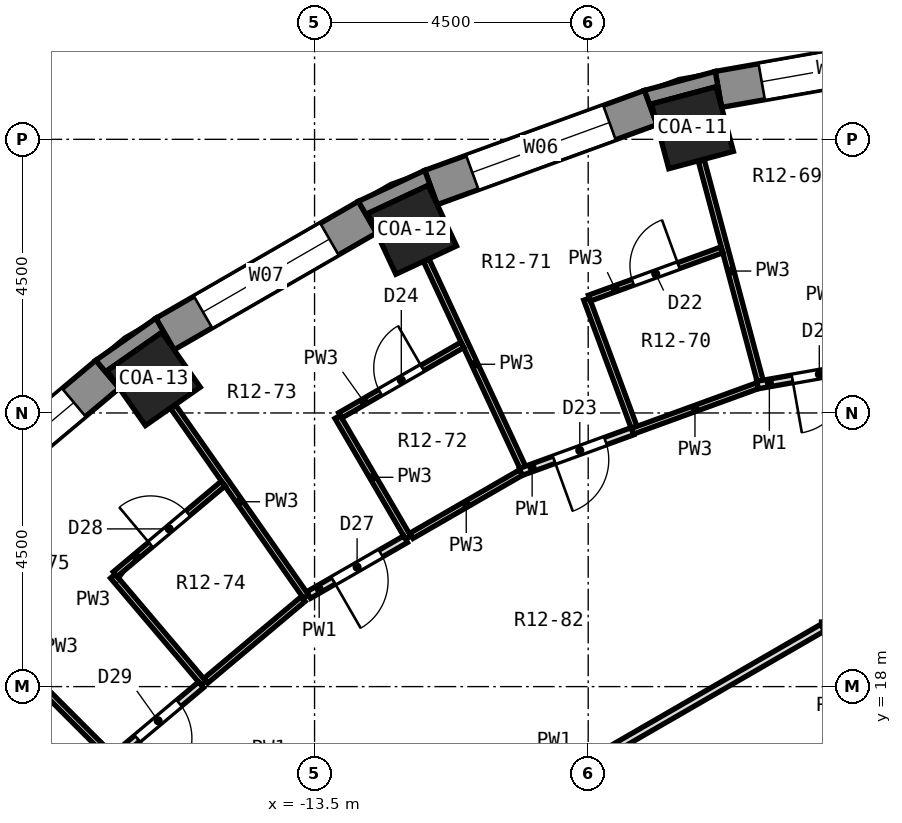
"""IFC4 building model, lengths in metres.
Left out: names, types, materials, properties, quantities, classifications, styles, units other than length and angle.
Written with IfcOpenShell. Run it as: python <this file> out.ifc"""

import sys

from ifc_helpers import new_model, si_unit, direction, frame, frame_2d, origin, origin_2d, place, context, subcontext, project, spatial, polyline, rectangle, outline, extrude, element, fill, save


model = new_model("IFC4")
c1 = context("Model", 3, precision=1e-05, world=origin(), true_north=direction((0.0, 1.0)))
c2 = subcontext(c1, "Body", "Model", "MODEL_VIEW")
j1 = project(units=[si_unit("LENGTHUNIT", "METRE"), si_unit("PLANEANGLEUNIT", "RADIAN")], contexts=[c1])
p1 = place(None, origin())
s1 = spatial("IfcSite", under=j1, at=p1, CompositionType="ELEMENT")
p2 = place(p1, origin())
s2 = spatial("IfcBuilding", under=s1, at=p2, CompositionType="ELEMENT")
p3 = place(p2, frame((0.0, 0.0, 56.0)))
s3 = spatial("IfcBuildingStorey", under=s2, at=p3, CompositionType="ELEMENT", Elevation=56.0)
for number, where, z_axis, x_axis in (
    (1, (-7.286, 27.191, 0.0), (0.0, 0.0, 1.0), (-0.259, 0.966, 0.0)),
    (2, (-11.897, 25.512, 0.0), (0.0, 0.0, 1.0), (-0.423, 0.906, 0.0)),
    (3, (-16.146, 23.059, 0.0), (0.0, 0.0, 1.0), (-0.574, 0.819, 0.0)),
):
    element("IfcColumn", number, at=place(p3, frame(where, z_axis=z_axis, x_axis=x_axis)), inside=s3, PredefinedType="COLUMN", context=c2, shape_type="SweptSolid", body=[
        extrude(rectangle(XDim=1.1, YDim=1.1, at=origin_2d()), origin(), (0.0, 0.0, 1.0), 3.3),
    ])
p4 = place(p3, frame((-3.071, 28.489, 0.0), z_axis=(0.0, 0.0, 1.0), x_axis=(-0.984800809218, -0.173687553279, 0.0)))
e4 = element("IfcWall", 4, at=p4, inside=s3, PredefinedType="SOLIDWALL", context=c2, shape_type="SweptSolid", body=[
    extrude(rectangle(XDim=3.846, YDim=0.6, at=frame_2d((1.923, 0.0))), origin(), (0.0, 0.0, 1.0), 2.75),
])
p5 = place(p4, frame((0.723, 0.0, 0.9)))
e5 = element("IfcOpeningElement", 5, at=p5, cuts=e4, PredefinedType="OPENING", context=c2, shape_type="SweptSolid", body=[
    extrude(rectangle(XDim=2.4, YDim=1.8, at=frame_2d((1.2, 0.9))), frame((0.0, 0.312, 0.0), z_axis=(0.0, -1.0, 0.0), x_axis=(1.0, 0.0, 0.0)), (0.0, 0.0, 1.0), 0.624),
])
p6 = place(p3, frame((-7.971, 27.523, 0.0), z_axis=(0.0, 0.0, 1.0), x_axis=(-0.939689588564, -0.342028474173, 0.0)))
e6 = element("IfcWall", 6, at=p6, inside=s3, PredefinedType="SOLIDWALL", context=c2, shape_type="SweptSolid", body=[
    extrude(rectangle(XDim=3.846, YDim=0.6, at=frame_2d((1.923, 0.0))), origin(), (0.0, 0.0, 1.0), 2.75),
])
p7 = place(p6, frame((0.723, 0.0, 0.9)))
e7 = element("IfcOpeningElement", 7, at=p7, cuts=e6, PredefinedType="OPENING", context=c2, shape_type="SweptSolid", body=[
    extrude(rectangle(XDim=2.4, YDim=1.8, at=frame_2d((1.2, 0.9))), frame((0.0, 0.312, 0.0), z_axis=(0.0, -1.0, 0.0), x_axis=(1.0, 0.0, 0.0)), (0.0, 0.0, 1.0), 0.624),
])
p8 = place(p3, frame((-12.63, 25.721, 0.0), z_axis=(0.0, 0.0, 1.0), x_axis=(-0.86603124159, -0.499989888488, 0.0)))
e8 = element("IfcWall", 8, at=p8, inside=s3, PredefinedType="SOLIDWALL", context=c2, shape_type="SweptSolid", body=[
    extrude(rectangle(XDim=3.846, YDim=0.6, at=frame_2d((1.923, 0.0))), origin(), (0.0, 0.0, 1.0), 2.75),
])
p9 = place(p8, frame((0.723, 0.0, 0.9)))
e9 = element("IfcOpeningElement", 9, at=p9, cuts=e8, PredefinedType="OPENING", context=c2, shape_type="SweptSolid", body=[
    extrude(rectangle(XDim=2.4, YDim=1.8, at=frame_2d((1.2, 0.9))), frame((0.0, 0.312, 0.0), z_axis=(0.0, -1.0, 0.0), x_axis=(1.0, 0.0, 0.0)), (0.0, 0.0, 1.0), 0.624),
])
p10 = place(p3, frame((-16.904, 23.137, 0.0), z_axis=(0.0, 0.0, 1.0), x_axis=(-0.766026164483, -0.642809392687, 0.0)))
e10 = element("IfcWall", 10, at=p10, inside=s3, PredefinedType="SOLIDWALL", context=c2, shape_type="SweptSolid", body=[
    extrude(rectangle(XDim=3.846, YDim=0.6, at=frame_2d((1.923, 0.0))), origin(), (0.0, 0.0, 1.0), 2.75),
])
p11 = place(p10, frame((0.723, 0.0, 0.9)))
e11 = element("IfcOpeningElement", 11, at=p11, cuts=e10, PredefinedType="OPENING", context=c2, shape_type="SweptSolid", body=[
    extrude(rectangle(XDim=2.4, YDim=1.8, at=frame_2d((1.2, 0.9))), frame((0.0, 0.312, 0.0), z_axis=(0.0, -1.0, 0.0), x_axis=(1.0, 0.0, 0.0)), (0.0, 0.0, 1.0), 0.624),
])
p12 = place(p3, origin())
e12 = element("IfcWall", 12, at=p12, inside=s3, PredefinedType="SOLIDWALL", context=c2, shape_type="SweptSolid", body=[
    extrude(outline(polyline([(-6.91, 28.117), (-8.074, 27.805), (-7.869, 27.241), (-7.959, 27.58), (-6.897, 27.865), (-6.806, 27.526), (-6.91, 28.117)])), origin(), (0.0, 0.0, 1.0), 2.75),
])
p13 = place(p3, origin())
e13 = element("IfcWall", 13, at=p13, inside=s3, PredefinedType="SOLIDWALL", context=c2, shape_type="SweptSolid", body=[
    extrude(outline(polyline([(-12.78, 25.981), (-12.479, 25.461), (-12.628, 25.779), (-11.631, 26.243), (-11.483, 25.926), (-11.688, 26.49), (-12.78, 25.981)])), origin(), (0.0, 0.0, 1.0), 2.75),
])
p14 = place(p3, origin())
e14 = element("IfcWall", 14, at=p14, inside=s3, PredefinedType="SOLIDWALL", context=c2, shape_type="SweptSolid", body=[
    extrude(outline(polyline([(-16.11, 24.058), (-17.097, 23.367), (-16.711, 22.907), (-16.912, 23.194), (-16.011, 23.825), (-15.81, 23.538), (-16.11, 24.058)])), origin(), (0.0, 0.0, 1.0), 2.75),
])
p15 = place(p3, frame((-7.139, 26.65, 0.0), z_axis=(0.0, 0.0, 1.0), x_axis=(0.258074907141, -0.966124910301, 0.0)))
e15 = element("IfcWall", 15, at=p15, inside=s3, PredefinedType="PARTITIONING", context=c2, shape_type="SweptSolid", body=[
    extrude(rectangle(XDim=3.76, YDim=0.1, at=frame_2d((1.88, 0.0))), origin(), (0.0, 0.0, 1.0), 2.75),
])
p16 = place(p3, frame((-9.026, 24.372, 0.0), z_axis=(0.0, 0.0, 1.0), x_axis=(0.347445153589, -0.937700306733, 0.0)))
e16 = element("IfcWall", 16, at=p16, inside=s3, PredefinedType="PARTITIONING", context=c2, shape_type="SweptSolid", body=[
    extrude(rectangle(XDim=2.249, YDim=0.1, at=frame_2d((1.125, 0.0))), origin(), (0.0, 0.0, 1.0), 2.75),
])
p17 = place(p3, frame((-11.66, 25.005, 0.0), z_axis=(0.0, 0.0, 1.0), x_axis=(0.422316636066, -0.906448376303, 0.0)))
e17 = element("IfcWall", 17, at=p17, inside=s3, PredefinedType="PARTITIONING", context=c2, shape_type="SweptSolid", body=[
    extrude(rectangle(XDim=3.76, YDim=0.1, at=frame_2d((1.88, 0.0))), origin(), (0.0, 0.0, 1.0), 2.75),
])
p18 = place(p3, frame((-13.121, 22.435, 0.0), z_axis=(0.0, 0.0, 1.0), x_axis=(0.504708754908, -0.863289680651, 0.0)))
e18 = element("IfcWall", 18, at=p18, inside=s3, PredefinedType="PARTITIONING", context=c2, shape_type="SweptSolid", body=[
    extrude(rectangle(XDim=2.301, YDim=0.1, at=frame_2d((1.15, 0.0))), origin(), (0.0, 0.0, 1.0), 2.75),
])
p19 = place(p3, frame((-15.825, 22.601, 0.0), z_axis=(0.0, 0.0, 1.0), x_axis=(0.573574167811, -0.819153632733, 0.0)))
e19 = element("IfcWall", 19, at=p19, inside=s3, PredefinedType="PARTITIONING", context=c2, shape_type="SweptSolid", body=[
    extrude(rectangle(XDim=3.81, YDim=0.1, at=frame_2d((1.905, 0.0))), origin(), (0.0, 0.0, 1.0), 2.75),
])
p20 = place(p3, frame((-16.817, 19.816, 0.0), z_axis=(0.0, 0.0, 1.0), x_axis=(0.646883930741, -0.762588473653, 0.0)))
e20 = element("IfcWall", 20, at=p20, inside=s3, PredefinedType="PARTITIONING", context=c2, shape_type="SweptSolid", body=[
    extrude(rectangle(XDim=2.3, YDim=0.1, at=frame_2d((1.15, 0.0))), origin(), (0.0, 0.0, 1.0), 2.75),
])
p21 = place(p3, frame((-19.509, 19.509, 0.0), z_axis=(0.0, 0.0, 1.0), x_axis=(0.707106781187, -0.707106781187, 0.0)))
e21 = element("IfcWall", 21, at=p21, inside=s3, PredefinedType="PARTITIONING", context=c2, shape_type="SweptSolid", body=[
    extrude(rectangle(XDim=3.81, YDim=0.1, at=frame_2d((1.905, 0.0))), origin(), (0.0, 0.0, 1.0), 2.75),
])
p22 = place(p3, frame((-5.163, 19.0, 0.0), z_axis=(0.0, 0.0, 1.0), x_axis=(1.0, 0.0, 0.0)))
e22 = element("IfcWall", 22, at=p22, inside=s3, PredefinedType="PARTITIONING", context=c2, shape_type="SweptSolid", body=[
    extrude(rectangle(XDim=10.192, YDim=0.125, at=frame_2d((5.096, 0.0))), origin(), (0.0, 0.0, 1.0), 2.75),
])
p23 = place(p22, frame((6.242, 0.0, 0.0)))
e23 = element("IfcOpeningElement", 23, at=p23, cuts=e22, PredefinedType="OPENING", context=c2, shape_type="SweptSolid", body=[
    extrude(rectangle(XDim=1.0, YDim=2.1, at=frame_2d((0.5, 1.05))), frame((0.0, 0.074, 0.0), z_axis=(0.0, -1.0, 0.0), x_axis=(1.0, 0.0, 0.0)), (0.0, 0.0, 1.0), 0.149),
])
p24 = place(p3, frame((-6.218, 22.959, 0.0), z_axis=(0.0, 0.0, 1.0), x_axis=(0.984803677322, 0.173671290469, 0.0)))
e24 = element("IfcWall", 24, at=p24, inside=s3, PredefinedType="PARTITIONING", context=c2, shape_type="SweptSolid", body=[
    extrude(rectangle(XDim=1.954, YDim=0.125, at=frame_2d((0.977, 0.0))), origin(), (0.0, 0.0, 1.0), 2.75),
])
p25 = place(p24, frame((0.584, 0.0, 0.0)))
e25 = element("IfcOpeningElement", 25, at=p25, cuts=e24, PredefinedType="OPENING", context=c2, shape_type="SweptSolid", body=[
    extrude(rectangle(XDim=0.9, YDim=2.1, at=frame_2d((0.45, 1.05))), frame((0.0, 0.074, 0.0), z_axis=(0.0, -1.0, 0.0), x_axis=(1.0, 0.0, 0.0)), (0.0, 0.0, 1.0), 0.149),
])
p26 = place(p3, frame((-8.274, 22.199, 0.0), z_axis=(0.0, 0.0, 1.0), x_axis=(0.939712116987, 0.341966573204, 0.0)))
e26 = element("IfcWall", 26, at=p26, inside=s3, PredefinedType="PARTITIONING", context=c2, shape_type="SweptSolid", body=[
    extrude(rectangle(XDim=2.192, YDim=0.1, at=frame_2d((1.096, 0.0))), origin(), (0.0, 0.0, 1.0), 2.75),
])
p27 = place(p3, frame((-10.11, 21.53, 0.0), z_axis=(0.0, 0.0, 1.0), x_axis=(0.939599898996, 0.342274786986, 0.0)))
e27 = element("IfcWall", 27, at=p27, inside=s3, PredefinedType="PARTITIONING", context=c2, shape_type="SweptSolid", body=[
    extrude(rectangle(XDim=1.954, YDim=0.125, at=frame_2d((0.977, 0.0))), origin(), (0.0, 0.0, 1.0), 2.75),
])
p28 = place(p27, frame((0.583, 0.0, 0.0)))
e28 = element("IfcOpeningElement", 28, at=p28, cuts=e27, PredefinedType="OPENING", context=c2, shape_type="SweptSolid", body=[
    extrude(rectangle(XDim=0.9, YDim=2.1, at=frame_2d((0.45, 1.05))), frame((0.0, 0.074, 0.0), z_axis=(0.0, -1.0, 0.0), x_axis=(1.0, 0.0, 0.0)), (0.0, 0.0, 1.0), 0.149),
])
p29 = place(p3, frame((-8.979, 24.389, 0.0), z_axis=(0.0, 0.0, 1.0), x_axis=(0.93967659433, 0.342064172443, 0.0)))
e29 = element("IfcWall", 29, at=p29, inside=s3, PredefinedType="PARTITIONING", context=c2, shape_type="SweptSolid", body=[
    extrude(rectangle(XDim=2.32, YDim=0.1, at=frame_2d((1.16, 0.0))), origin(), (0.0, 0.0, 1.0), 2.75),
])
p30 = place(p29, frame((0.76, 0.0, 0.0)))
e30 = element("IfcOpeningElement", 30, at=p30, cuts=e29, PredefinedType="OPENING", context=c2, shape_type="SweptSolid", body=[
    extrude(rectangle(XDim=0.8, YDim=2.1, at=frame_2d((0.4, 1.05))), frame((0.0, 0.062, 0.0), z_axis=(0.0, -1.0, 0.0), x_axis=(1.0, 0.0, 0.0)), (0.0, 0.0, 1.0), 0.124),
])
p31 = place(p3, frame((-13.597, 19.506, 0.0), z_axis=(0.0, 0.0, 1.0), x_axis=(0.866538954681, 0.499109446936, 0.0)))
e31 = element("IfcWall", 31, at=p31, inside=s3, PredefinedType="PARTITIONING", context=c2, shape_type="SweptSolid", body=[
    extrude(rectangle(XDim=1.839, YDim=0.125, at=frame_2d((0.919, 0.0))), origin(), (0.0, 0.0, 1.0), 2.75),
])
p32 = place(p31, frame((0.47, 0.0, 0.0)))
e32 = element("IfcOpeningElement", 32, at=p32, cuts=e31, PredefinedType="OPENING", context=c2, shape_type="SweptSolid", body=[
    extrude(rectangle(XDim=0.9, YDim=2.1, at=frame_2d((0.45, 1.05))), frame((0.0, 0.074, 0.0), z_axis=(0.0, -1.0, 0.0), x_axis=(1.0, 0.0, 0.0)), (0.0, 0.0, 1.0), 0.149),
])
p33 = place(p3, frame((-13.971, 13.873, 0.0), z_axis=(0.0, 0.0, 1.0), x_axis=(0.866024825845, 0.50000100102, 0.0)))
e33 = element("IfcWall", 33, at=p33, inside=s3, PredefinedType="PARTITIONING", context=c2, shape_type="SweptSolid", body=[
    extrude(rectangle(XDim=10.192, YDim=0.125, at=frame_2d((5.096, 0.0))), origin(), (0.0, 0.0, 1.0), 2.75),
])
p34 = place(p3, frame((-11.906, 20.48, 0.0), z_axis=(0.0, 0.0, 1.0), x_axis=(0.865966712092, 0.500101643217, 0.0)))
e34 = element("IfcWall", 34, at=p34, inside=s3, PredefinedType="PARTITIONING", context=c2, shape_type="SweptSolid", body=[
    extrude(rectangle(XDim=2.081, YDim=0.1, at=frame_2d((1.04, 0.0))), origin(), (0.0, 0.0, 1.0), 2.75),
])
p35 = place(p3, frame((-13.078, 22.46, 0.0), z_axis=(0.0, 0.0, 1.0), x_axis=(0.865947141423, 0.500135529893, 0.0)))
e35 = element("IfcWall", 35, at=p35, inside=s3, PredefinedType="PARTITIONING", context=c2, shape_type="SweptSolid", body=[
    extrude(rectangle(XDim=2.319, YDim=0.1, at=frame_2d((1.16, 0.0))), origin(), (0.0, 0.0, 1.0), 2.75),
])
p36 = place(p35, frame((0.76, 0.0, 0.0)))
e36 = element("IfcOpeningElement", 36, at=p36, cuts=e35, PredefinedType="OPENING", context=c2, shape_type="SweptSolid", body=[
    extrude(rectangle(XDim=0.8, YDim=2.1, at=frame_2d((0.4, 1.05))), frame((0.0, 0.062, 0.0), z_axis=(0.0, -1.0, 0.0), x_axis=(1.0, 0.0, 0.0)), (0.0, 0.0, 1.0), 0.124),
])
p37 = place(p3, frame((-15.291, 18.094, 0.0), z_axis=(0.0, 0.0, 1.0), x_axis=(0.765911671875, 0.642945807114, 0.0)))
e37 = element("IfcWall", 37, at=p37, inside=s3, PredefinedType="PARTITIONING", context=c2, shape_type="SweptSolid", body=[
    extrude(rectangle(XDim=2.093, YDim=0.1, at=frame_2d((1.046, 0.0))), origin(), (0.0, 0.0, 1.0), 2.75),
])
p38 = place(p3, frame((-16.777, 16.847, 0.0), z_axis=(0.0, 0.0, 1.0), x_axis=(0.766052425686, 0.642778096314, 0.0)))
e38 = element("IfcWall", 38, at=p38, inside=s3, PredefinedType="PARTITIONING", context=c2, shape_type="SweptSolid", body=[
    extrude(rectangle(XDim=1.84, YDim=0.125, at=frame_2d((0.92, 0.0))), origin(), (0.0, 0.0, 1.0), 2.75),
])
p39 = place(p38, frame((0.47, 0.0, 0.0)))
e39 = element("IfcOpeningElement", 39, at=p39, cuts=e38, PredefinedType="OPENING", context=c2, shape_type="SweptSolid", body=[
    extrude(rectangle(XDim=0.9, YDim=2.1, at=frame_2d((0.45, 1.05))), frame((0.0, 0.074, 0.0), z_axis=(0.0, -1.0, 0.0), x_axis=(1.0, 0.0, 0.0)), (0.0, 0.0, 1.0), 0.149),
])
p40 = place(p3, frame((-16.779, 19.848, 0.0), z_axis=(0.0, 0.0, 1.0), x_axis=(0.766051078848, 0.642779701449, 0.0)))
e40 = element("IfcWall", 40, at=p40, inside=s3, PredefinedType="PARTITIONING", context=c2, shape_type="SweptSolid", body=[
    extrude(rectangle(XDim=2.319, YDim=0.1, at=frame_2d((1.16, 0.0))), origin(), (0.0, 0.0, 1.0), 2.75),
])
p41 = place(p40, frame((0.76, 0.0, 0.0)))
e41 = element("IfcOpeningElement", 41, at=p41, cuts=e40, PredefinedType="OPENING", context=c2, shape_type="SweptSolid", body=[
    extrude(rectangle(XDim=0.8, YDim=2.1, at=frame_2d((0.4, 1.05))), frame((0.0, 0.062, 0.0), z_axis=(0.0, -1.0, 0.0), x_axis=(1.0, 0.0, 0.0)), (0.0, 0.0, 1.0), 0.124),
])
p42 = place(p5, origin())
e42 = element("IfcWindow", 42, at=p42, inside=s3, PartitioningType="SINGLE_PANEL", PredefinedType="WINDOW", context=c2, shape_type="SweptSolid", body=[
    extrude(rectangle(XDim=2.4, YDim=1.8, at=frame_2d((1.2, 0.9))), frame((0.0, 0.18, 0.0), z_axis=(0.0, -1.0, 0.0), x_axis=(1.0, 0.0, 0.0)), (0.0, 0.0, 1.0), 0.06),
])
fill(e5, e42)
p43 = place(p7, origin())
e43 = element("IfcWindow", 43, at=p43, inside=s3, PartitioningType="SINGLE_PANEL", PredefinedType="WINDOW", context=c2, shape_type="SweptSolid", body=[
    extrude(rectangle(XDim=2.4, YDim=1.8, at=frame_2d((1.2, 0.9))), frame((0.0, 0.18, 0.0), z_axis=(0.0, -1.0, 0.0), x_axis=(1.0, 0.0, 0.0)), (0.0, 0.0, 1.0), 0.06),
])
fill(e7, e43)
p44 = place(p9, origin())
e44 = element("IfcWindow", 44, at=p44, inside=s3, PartitioningType="SINGLE_PANEL", PredefinedType="WINDOW", context=c2, shape_type="SweptSolid", body=[
    extrude(rectangle(XDim=2.4, YDim=1.8, at=frame_2d((1.2, 0.9))), frame((0.0, 0.18, 0.0), z_axis=(0.0, -1.0, 0.0), x_axis=(1.0, 0.0, 0.0)), (0.0, 0.0, 1.0), 0.06),
])
fill(e9, e44)
p45 = place(p11, origin())
e45 = element("IfcWindow", 45, at=p45, inside=s3, PartitioningType="SINGLE_PANEL", PredefinedType="WINDOW", context=c2, shape_type="SweptSolid", body=[
    extrude(rectangle(XDim=2.4, YDim=1.8, at=frame_2d((1.2, 0.9))), frame((0.0, 0.18, 0.0), z_axis=(0.0, -1.0, 0.0), x_axis=(1.0, 0.0, 0.0)), (0.0, 0.0, 1.0), 0.06),
])
fill(e11, e45)
p46 = place(p25, frame((0.9, 0.0, 0.0), z_axis=(0.0, 0.0, 1.0), x_axis=(-1.0, 0.0, 0.0)))
e46 = element("IfcDoor", 46, at=p46, inside=s3, OperationType="SINGLE_SWING_RIGHT", PredefinedType="DOOR", context=c2, shape_type="SweptSolid", body=[
    extrude(rectangle(XDim=0.9, YDim=2.1, at=frame_2d((0.45, 1.05))), frame((0.0, 0.025, 0.0), z_axis=(0.0, -1.0, 0.0), x_axis=(1.0, 0.0, 0.0)), (0.0, 0.0, 1.0), 0.05),
])
fill(e25, e46)
p47 = place(p30, origin())
e47 = element("IfcDoor", 47, at=p47, inside=s3, OperationType="SINGLE_SWING_RIGHT", PredefinedType="DOOR", context=c2, shape_type="SweptSolid", body=[
    extrude(rectangle(XDim=0.8, YDim=2.1, at=frame_2d((0.4, 1.05))), frame((0.0, 0.025, 0.0), z_axis=(0.0, -1.0, 0.0), x_axis=(1.0, 0.0, 0.0)), (0.0, 0.0, 1.0), 0.05),
])
fill(e30, e47)
p48 = place(p28, frame((0.9, 0.0, 0.0), z_axis=(0.0, 0.0, 1.0), x_axis=(-1.0, 0.0, 0.0)))
e48 = element("IfcDoor", 48, at=p48, inside=s3, OperationType="SINGLE_SWING_RIGHT", PredefinedType="DOOR", context=c2, shape_type="SweptSolid", body=[
    extrude(rectangle(XDim=0.9, YDim=2.1, at=frame_2d((0.45, 1.05))), frame((0.0, 0.025, 0.0), z_axis=(0.0, -1.0, 0.0), x_axis=(1.0, 0.0, 0.0)), (0.0, 0.0, 1.0), 0.05),
])
fill(e28, e48)
p49 = place(p36, origin())
e49 = element("IfcDoor", 49, at=p49, inside=s3, OperationType="SINGLE_SWING_RIGHT", PredefinedType="DOOR", context=c2, shape_type="SweptSolid", body=[
    extrude(rectangle(XDim=0.8, YDim=2.1, at=frame_2d((0.4, 1.05))), frame((0.0, 0.025, 0.0), z_axis=(0.0, -1.0, 0.0), x_axis=(1.0, 0.0, 0.0)), (0.0, 0.0, 1.0), 0.05),
])
fill(e36, e49)
p50 = place(p32, frame((0.9, 0.0, 0.0), z_axis=(0.0, 0.0, 1.0), x_axis=(-1.0, 0.0, 0.0)))
e50 = element("IfcDoor", 50, at=p50, inside=s3, OperationType="SINGLE_SWING_RIGHT", PredefinedType="DOOR", context=c2, shape_type="SweptSolid", body=[
    extrude(rectangle(XDim=0.9, YDim=2.1, at=frame_2d((0.45, 1.05))), frame((0.0, 0.025, 0.0), z_axis=(0.0, -1.0, 0.0), x_axis=(1.0, 0.0, 0.0)), (0.0, 0.0, 1.0), 0.05),
])
fill(e32, e50)
p51 = place(p41, origin())
e51 = element("IfcDoor", 51, at=p51, inside=s3, OperationType="SINGLE_SWING_LEFT", PredefinedType="DOOR", context=c2, shape_type="SweptSolid", body=[
    extrude(rectangle(XDim=0.8, YDim=2.1, at=frame_2d((0.4, 1.05))), frame((0.0, 0.025, 0.0), z_axis=(0.0, -1.0, 0.0), x_axis=(1.0, 0.0, 0.0)), (0.0, 0.0, 1.0), 0.05),
])
fill(e41, e51)
p52 = place(p39, frame((0.9, 0.0, 0.0), z_axis=(0.0, 0.0, 1.0), x_axis=(-1.0, 0.0, 0.0)))
e52 = element("IfcDoor", 52, at=p52, inside=s3, OperationType="SINGLE_SWING_RIGHT", PredefinedType="DOOR", context=c2, shape_type="SweptSolid", body=[
    extrude(rectangle(XDim=0.9, YDim=2.1, at=frame_2d((0.45, 1.05))), frame((0.0, 0.025, 0.0), z_axis=(0.0, -1.0, 0.0), x_axis=(1.0, 0.0, 0.0)), (0.0, 0.0, 1.0), 0.05),
])
fill(e39, e52)
save(model, sys.argv[1])
